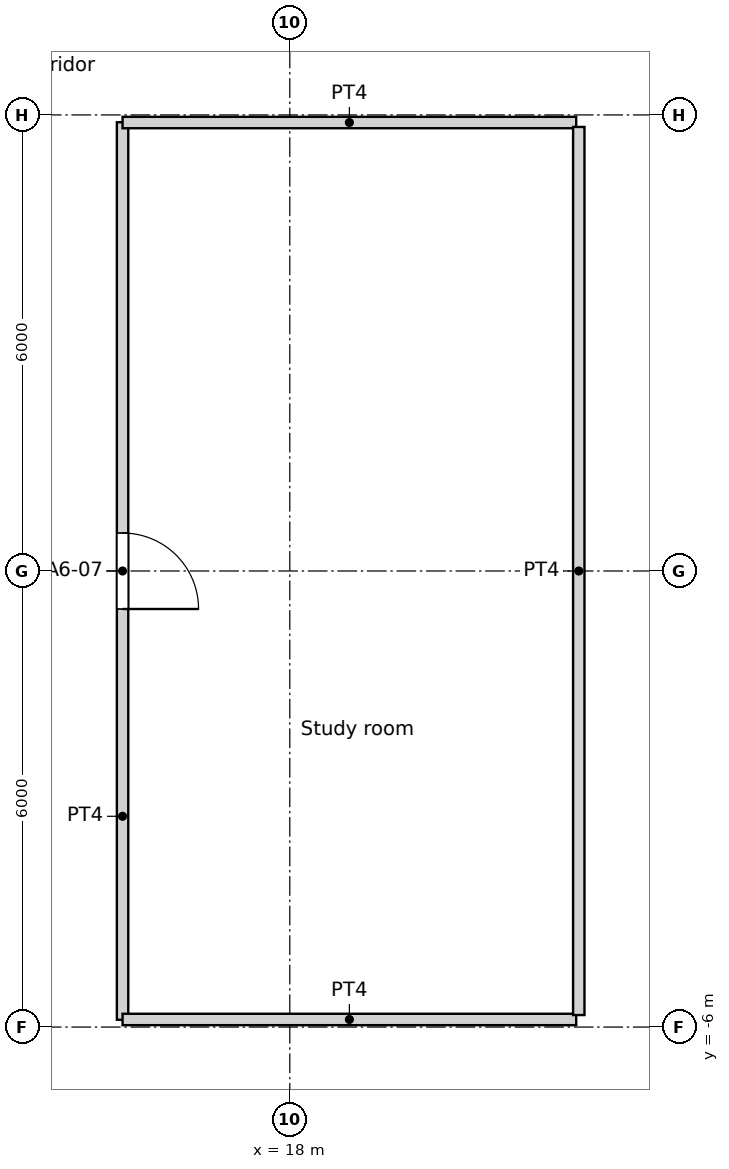
"""IFC4 building model, lengths in metres.
Left out: names, types, materials, properties, quantities, classifications, styles, units other than length and angle.
Written with IfcOpenShell. Run it as: python <this file> out.ifc"""

import sys

from ifc_helpers import new_model, si_unit, direction, frame, frame_2d, origin, origin_2d, place, context, subcontext, project, spatial, rectangle, circle, extrude, element, fill, save


model = new_model("IFC4")
c1 = context("Model", 3, precision=1e-05, world=origin(), true_north=direction((0.0, 1.0)))
c2 = subcontext(c1, "Body", "Model", "MODEL_VIEW")
j1 = project(units=[si_unit("LENGTHUNIT", "METRE"), si_unit("PLANEANGLEUNIT", "RADIAN")], contexts=[c1])
p1 = place(None, origin())
s1 = spatial("IfcSite", under=j1, at=p1, CompositionType="ELEMENT")
p2 = place(p1, origin())
s2 = spatial("IfcBuilding", under=s1, at=p2, CompositionType="ELEMENT")
p3 = place(p2, frame((0.0, 0.0, 82.2)))
s3 = spatial("IfcBuildingStorey", under=s2, at=p3, CompositionType="ELEMENT", Elevation=82.2)
for number, where, z_axis, x_axis in (
    (1, (18.822, 0.0, 0.0), (0.0, 0.0, 1.0), (1.0, 0.0, 0.0)),
    (2, (17.986, 5.548, 0.0), (0.0, 0.0, 1.0), (1.0, 0.0, 0.0)),
    (3, (17.986, -5.548, 0.0), (0.0, 0.0, 1.0), (1.0, 0.0, 0.0)),
):
    element("IfcColumn", number, at=place(p3, frame(where, z_axis=z_axis, x_axis=x_axis)), inside=s3, PredefinedType="COLUMN", context=c2, shape_type="SweptSolid", body=[
        extrude(circle(Radius=0.7, at=origin_2d()), origin(), (0.0, 0.0, 1.0), 3.6),
    ])
p4 = place(p3, frame((15.8, -5.904, 0.0), z_axis=(0.0, 0.0, 1.0), x_axis=(0.0, 1.0, 0.0)))
e4 = element("IfcWall", 4, at=p4, inside=s3, PredefinedType="PARTITIONING", context=c2, shape_type="SweptSolid", body=[
    extrude(rectangle(XDim=11.808, YDim=0.15, at=frame_2d((5.904, 0.0))), origin(), (0.0, 0.0, 1.0), 3.15),
])
p5 = place(p4, frame((5.404, 0.0, 0.0)))
e5 = element("IfcOpeningElement", 5, at=p5, cuts=e4, PredefinedType="OPENING", context=c2, shape_type="SweptSolid", body=[
    extrude(rectangle(XDim=1.0, YDim=2.04, at=frame_2d((0.5, 1.02))), frame((0.0, 0.075, 0.0), z_axis=(0.0, -1.0, 0.0), x_axis=(1.0, 0.0, 0.0)), (0.0, 0.0, 1.0), 0.15),
])
p6 = place(p3, frame((15.8, -5.9, 0.0), z_axis=(0.0, 0.0, 1.0), x_axis=(1.0, 0.0, 0.0)))
e6 = element("IfcWall", 6, at=p6, inside=s3, PredefinedType="PARTITIONING", context=c2, shape_type="SweptSolid", body=[
    extrude(rectangle(XDim=5.968, YDim=0.15, at=frame_2d((2.984, 0.0))), origin(), (0.0, 0.0, 1.0), 3.15),
])
p7 = place(p3, frame((21.802, -5.842, 0.0), z_axis=(0.0, 0.0, 1.0), x_axis=(0.0, 1.0, 0.0)))
e7 = element("IfcWall", 7, at=p7, inside=s3, PredefinedType="PARTITIONING", context=c2, shape_type="SweptSolid", body=[
    extrude(rectangle(XDim=11.684, YDim=0.15, at=frame_2d((5.842, 0.0))), origin(), (0.0, 0.0, 1.0), 3.15),
])
p8 = place(p3, frame((15.8, 5.9, 0.0), z_axis=(0.0, 0.0, 1.0), x_axis=(1.0, 0.0, 0.0)))
e8 = element("IfcWall", 8, at=p8, inside=s3, PredefinedType="PARTITIONING", context=c2, shape_type="SweptSolid", body=[
    extrude(rectangle(XDim=5.968, YDim=0.15, at=frame_2d((2.984, 0.0))), origin(), (0.0, 0.0, 1.0), 3.15),
])
p9 = place(p3, frame((22.14, 14.229, 0.0), z_axis=(0.0, 0.0, 1.0), x_axis=(0.281845438276, -0.959459821422, 0.0)))
e9 = element("IfcWall", 9, at=p9, inside=s3, PredefinedType="PARTITIONING", context=c2, shape_type="SweptSolid", body=[
    extrude(rectangle(XDim=14.83, YDim=0.15, at=frame_2d((7.415, 0.0))), origin(), (0.0, 0.0, 1.0), 3.15),
])
p10 = place(p9, frame((6.053, 0.0, 0.0)))
e10 = element("IfcOpeningElement", 10, at=p10, cuts=e9, PredefinedType="OPENING", context=c2, shape_type="SweptSolid", body=[
    extrude(rectangle(XDim=1.0, YDim=2.1, at=frame_2d((0.5, 1.05))), frame((0.0, 0.075, 0.0), z_axis=(0.0, -1.0, 0.0), x_axis=(1.0, 0.0, 0.0)), (0.0, 0.0, 1.0), 0.15),
])
p11 = place(p3, frame((22.141, -14.229, 0.0), z_axis=(0.0, 0.0, 1.0), x_axis=(0.281730446162, 0.959493593363, 0.0)))
e11 = element("IfcWall", 11, at=p11, inside=s3, PredefinedType="PARTITIONING", context=c2, shape_type="SweptSolid", body=[
    extrude(rectangle(XDim=14.83, YDim=0.15, at=frame_2d((7.415, 0.0))), origin(), (0.0, 0.0, 1.0), 3.15),
])
p12 = place(p11, frame((6.665, 0.0, 0.0)))
e12 = element("IfcOpeningElement", 12, at=p12, cuts=e11, PredefinedType="OPENING", context=c2, shape_type="SweptSolid", body=[
    extrude(rectangle(XDim=1.0, YDim=2.04, at=frame_2d((0.5, 1.02))), frame((0.0, 0.075, 0.0), z_axis=(0.0, -1.0, 0.0), x_axis=(1.0, 0.0, 0.0)), (0.0, 0.0, 1.0), 0.15),
])
p13 = place(p5, origin())
e13 = element("IfcDoor", 13, at=p13, inside=s3, OperationType="SINGLE_SWING_RIGHT", PredefinedType="DOOR", context=c2, shape_type="SweptSolid", body=[
    extrude(rectangle(XDim=1.0, YDim=2.04, at=frame_2d((0.5, 1.02))), frame((0.0, 0.025, 0.0), z_axis=(0.0, -1.0, 0.0), x_axis=(1.0, 0.0, 0.0)), (0.0, 0.0, 1.0), 0.05),
])
fill(e5, e13)
save(model, sys.argv[1])
